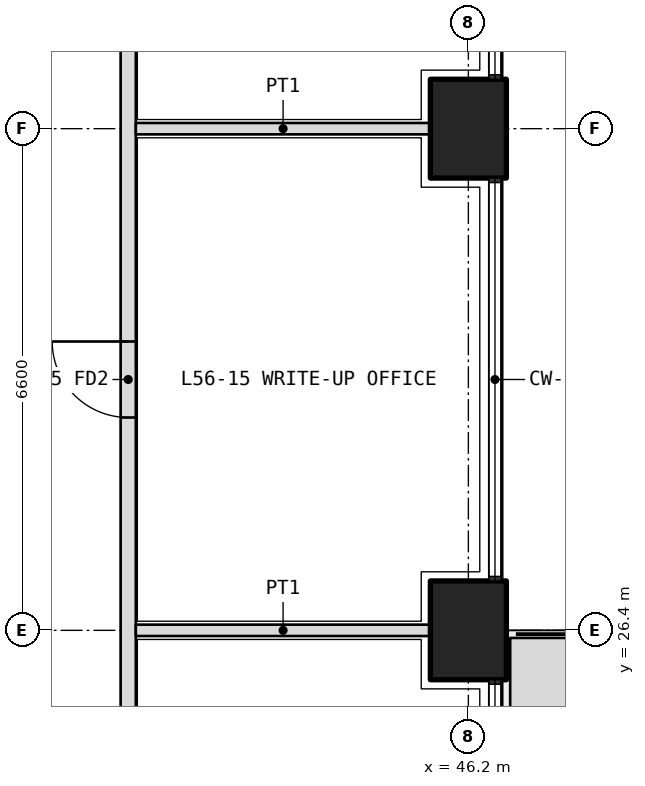
"""IFC4 building model, lengths in metres.
Left out: names, types, materials, properties, quantities, classifications, styles, units other than length and angle.
Written with IfcOpenShell. Run it as: python <this file> out.ifc"""

import sys

from ifc_helpers import new_model, si_unit, direction, frame, frame_2d, origin, origin_2d, place, context, subcontext, project, spatial, polyline, rectangle, outline, extrude, element, fill, save


model = new_model("IFC4")
c1 = context("Model", 3, precision=1e-05, world=origin(), true_north=direction((0.0, 1.0)))
c2 = subcontext(c1, "Body", "Model", "MODEL_VIEW")
j1 = project(units=[si_unit("LENGTHUNIT", "METRE"), si_unit("PLANEANGLEUNIT", "RADIAN")], contexts=[c1])
p1 = place(None, origin())
s1 = spatial("IfcSite", under=j1, at=p1, CompositionType="ELEMENT")
p2 = place(p1, origin())
s2 = spatial("IfcBuilding", under=s1, at=p2, CompositionType="ELEMENT")
p3 = place(p2, frame((0.0, 0.0, 246.0)))
s3 = spatial("IfcBuildingStorey", under=s2, at=p3, CompositionType="ELEMENT", Elevation=246.0)
for number, where, z_axis, x_axis in (
    (1, (46.2, 26.4, 0.0), (0.0, 0.0, 1.0), (0.0, 1.0, 0.0)),
    (2, (46.2, 33.0, 0.0), (0.0, 0.0, 1.0), (0.0, 1.0, 0.0)),
):
    element("IfcColumn", number, at=place(p3, frame(where, z_axis=z_axis, x_axis=x_axis)), inside=s3, PredefinedType="COLUMN", context=c2, shape_type="SweptSolid", body=[
        extrude(rectangle(XDim=1.3, YDim=1.0, at=origin_2d()), origin(), (0.0, 0.0, 1.0), 4.2),
    ])
p4 = place(p3, origin())
e3 = element("IfcWall", 3, at=p4, inside=s3, PredefinedType="USERDEFINED", context=c2, shape_type="SweptSolid", body=[
    extrude(outline(polyline([(46.75, 17.25), (47.75, 17.25), (47.75, 26.3), (46.75, 26.3), (46.75, 17.25)]), holes=[polyline([(46.9, 17.4), (47.6, 17.4), (47.6, 26.15), (46.9, 26.15), (46.9, 17.4)])]), origin(), (0.0, 0.0, 1.0), 1.05),
])
p5 = place(p3, frame((41.725, 7.4, 0.0), z_axis=(0.0, 0.0, 1.0), x_axis=(0.0, 1.0, 0.0)))
e4 = element("IfcWall", 4, at=p5, inside=s3, PredefinedType="PARTITIONING", context=c2, shape_type="SweptSolid", body=[
    extrude(rectangle(XDim=31.4, YDim=0.2, at=frame_2d((15.7, 0.0))), origin(), (0.0, 0.0, 1.0), 3.0),
])
p6 = place(p5, frame((5.65, 0.0, 0.0)))
e5 = element("IfcOpeningElement", 5, at=p6, cuts=e4, PredefinedType="OPENING", context=c2, shape_type="SweptSolid", body=[
    extrude(rectangle(XDim=1.0, YDim=2.1, at=frame_2d((0.5, 1.05))), frame((0.0, 0.11, 0.0), z_axis=(0.0, -1.0, 0.0), x_axis=(1.0, 0.0, 0.0)), (0.0, 0.0, 1.0), 0.22),
])
p7 = place(p5, frame((13.4, 0.0, 0.0)))
e6 = element("IfcOpeningElement", 6, at=p7, cuts=e4, PredefinedType="OPENING", context=c2, shape_type="SweptSolid", body=[
    extrude(rectangle(XDim=1.0, YDim=2.1, at=frame_2d((0.5, 1.05))), frame((0.0, 0.11, 0.0), z_axis=(0.0, -1.0, 0.0), x_axis=(1.0, 0.0, 0.0)), (0.0, 0.0, 1.0), 0.22),
])
p8 = place(p5, frame((16.75, 0.0, 0.0)))
e7 = element("IfcOpeningElement", 7, at=p8, cuts=e4, PredefinedType="OPENING", context=c2, shape_type="SweptSolid", body=[
    extrude(rectangle(XDim=0.9, YDim=2.1, at=frame_2d((0.45, 1.05))), frame((0.0, 0.11, 0.0), z_axis=(0.0, -1.0, 0.0), x_axis=(1.0, 0.0, 0.0)), (0.0, 0.0, 1.0), 0.22),
])
p9 = place(p5, frame((21.8, 0.0, 0.0)))
e8 = element("IfcOpeningElement", 8, at=p9, cuts=e4, PredefinedType="OPENING", context=c2, shape_type="SweptSolid", body=[
    extrude(rectangle(XDim=1.0, YDim=2.1, at=frame_2d((0.5, 1.05))), frame((0.0, 0.11, 0.0), z_axis=(0.0, -1.0, 0.0), x_axis=(1.0, 0.0, 0.0)), (0.0, 0.0, 1.0), 0.22),
])
p10 = place(p5, frame((28.05, 0.0, 0.0)))
e9 = element("IfcOpeningElement", 9, at=p10, cuts=e4, PredefinedType="OPENING", context=c2, shape_type="SweptSolid", body=[
    extrude(rectangle(XDim=1.0, YDim=2.1, at=frame_2d((0.5, 1.05))), frame((0.0, 0.11, 0.0), z_axis=(0.0, -1.0, 0.0), x_axis=(1.0, 0.0, 0.0)), (0.0, 0.0, 1.0), 0.22),
])
for number, where, z_axis, x_axis in (
    (10, (45.7, 26.4, 0.0), (0.0, 0.0, 1.0), (-1.0, 0.0, 0.0)),
    (11, (45.7, 33.0, 0.0), (0.0, 0.0, 1.0), (-1.0, 0.0, 0.0)),
):
    element("IfcWall", number, at=place(p3, frame(where, z_axis=z_axis, x_axis=x_axis)), inside=s3, PredefinedType="PARTITIONING", context=c2, shape_type="SweptSolid", body=[
        extrude(rectangle(XDim=3.875, YDim=0.15, at=frame_2d((1.938, 0.0))), origin(), (0.0, 0.0, 1.0), 3.0),
    ])
p11 = place(p9, origin())
e12 = element("IfcDoor", 12, at=p11, inside=s3, OperationType="SINGLE_SWING_RIGHT", PredefinedType="DOOR", context=c2, shape_type="SweptSolid", body=[
    extrude(rectangle(XDim=1.0, YDim=2.1, at=frame_2d((0.5, 1.05))), frame((0.0, 0.025, 0.0), z_axis=(0.0, -1.0, 0.0), x_axis=(1.0, 0.0, 0.0)), (0.0, 0.0, 1.0), 0.05),
])
fill(e8, e12)
save(model, sys.argv[1])
